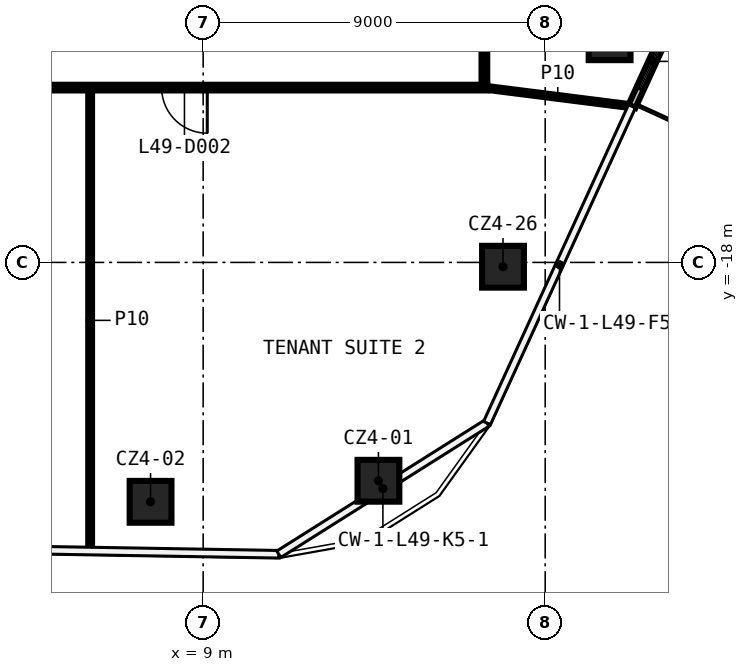
"""IFC4 building model, lengths in metres.
Left out: names, types, materials, properties, quantities, classifications, styles, units other than length and angle.
Written with IfcOpenShell. Run it as: python <this file> out.ifc"""

import sys

from ifc_helpers import new_model, si_unit, direction, frame, frame_2d, origin, origin_2d, place, context, subcontext, project, spatial, rectangle, extrude, element, fill, save


model = new_model("IFC4")
c1 = context("Model", 3, precision=1e-05, world=origin(), true_north=direction((0.0, 1.0)))
c2 = subcontext(c1, "Body", "Model", "MODEL_VIEW")
j1 = project(units=[si_unit("LENGTHUNIT", "METRE"), si_unit("PLANEANGLEUNIT", "RADIAN")], contexts=[c1])
p1 = place(None, origin())
s1 = spatial("IfcSite", under=j1, at=p1, CompositionType="ELEMENT")
p2 = place(p1, origin())
s2 = spatial("IfcBuilding", under=s1, at=p2, CompositionType="ELEMENT")
p3 = place(p2, frame((0.0, 0.0, 237.0)))
s3 = spatial("IfcBuildingStorey", under=s2, at=p3, CompositionType="ELEMENT", Elevation=237.0)
for number, where, z_axis, x_axis in (
    (1, (13.612, -23.746, 0.0), (0.0, 0.0, 1.0), (1.0, 0.0, 0.0)),
    (2, (7.616, -24.3, 0.0), (0.0, 0.0, 1.0), (1.0, 0.0, 0.0)),
    (3, (19.695, -12.127, 0.0), (0.0, 0.0, 1.0), (1.0, 0.0, 0.0)),
    (4, (16.89, -18.114, 0.0), (0.0, 0.0, 1.0), (1.0, 0.0, 0.0)),
):
    element("IfcColumn", number, at=place(p3, frame(where, z_axis=z_axis, x_axis=x_axis)), inside=s3, PredefinedType="COLUMN", context=c2, shape_type="SweptSolid", body=[
        extrude(rectangle(XDim=1.1, YDim=1.1, at=origin_2d()), origin(), (0.0, 0.0, 1.0), 3.82),
    ])
p4 = place(p3, frame((16.475, -13.4, 0.0), z_axis=(0.0, 0.0, 1.0), x_axis=(-1.0, 0.0, 0.0)))
e5 = element("IfcWall", 5, at=p4, inside=s3, PredefinedType="PARTITIONING", context=c2, shape_type="SweptSolid", body=[
    extrude(rectangle(XDim=18.55, YDim=0.15, at=frame_2d((9.275, 0.0))), origin(), (0.0, 0.0, 1.0), 3.82),
])
p5 = place(p4, frame((7.367, 0.0, 0.0)))
e6 = element("IfcOpeningElement", 6, at=p5, cuts=e5, PredefinedType="OPENING", context=c2, shape_type="SweptSolid", body=[
    extrude(rectangle(XDim=1.2, YDim=2.1, at=frame_2d((0.6, 1.05))), frame((0.0, 0.085, 0.0), z_axis=(0.0, -1.0, 0.0), x_axis=(1.0, 0.0, 0.0)), (0.0, 0.0, 1.0), 0.17),
])
p6 = place(p3, frame((16.4, 13.325, 0.0), z_axis=(0.0, 0.0, 1.0), x_axis=(0.0, -1.0, 0.0)))
e7 = element("IfcWall", 7, at=p6, inside=s3, PredefinedType="PARTITIONING", context=c2, shape_type="SweptSolid", body=[
    extrude(rectangle(XDim=26.65, YDim=0.15, at=frame_2d((13.325, 0.0))), origin(), (0.0, 0.0, 1.0), 3.82),
])
p7 = place(p6, frame((22.199, 0.0, 0.0)))
e8 = element("IfcOpeningElement", 8, at=p7, cuts=e7, PredefinedType="OPENING", context=c2, shape_type="SweptSolid", body=[
    extrude(rectangle(XDim=1.2, YDim=2.1, at=frame_2d((0.6, 1.05))), frame((0.0, 0.085, 0.0), z_axis=(0.0, -1.0, 0.0), x_axis=(1.0, 0.0, 0.0)), (0.0, 0.0, 1.0), 0.17),
])
p8 = place(p6, frame((5.651, 0.0, 0.0)))
e9 = element("IfcOpeningElement", 9, at=p8, cuts=e7, PredefinedType="OPENING", context=c2, shape_type="SweptSolid", body=[
    extrude(rectangle(XDim=1.2, YDim=2.1, at=frame_2d((0.6, 1.05))), frame((0.0, 0.085, 0.0), z_axis=(0.0, -1.0, 0.0), x_axis=(1.0, 0.0, 0.0)), (0.0, 0.0, 1.0), 0.17),
])
p9 = place(p3, frame((6.026, -25.576, 0.0), z_axis=(0.0, 0.0, 1.0), x_axis=(0.0, 1.0, 0.0)))
e10 = element("IfcWall", 10, at=p9, inside=s3, PredefinedType="PARTITIONING", context=c2, shape_type="SweptSolid", body=[
    extrude(rectangle(XDim=12.101, YDim=0.1, at=frame_2d((6.05, 0.0))), origin(), (0.0, 0.0, 1.0), 3.82),
])
p10 = place(p3, frame((16.4, -13.4, 0.0), z_axis=(0.0, 0.0, 1.0), x_axis=(0.992073977013, -0.125655179493, 0.0)))
e11 = element("IfcWall", 11, at=p10, inside=s3, PredefinedType="PARTITIONING", context=c2, shape_type="SweptSolid", body=[
    extrude(rectangle(XDim=3.894, YDim=0.1, at=frame_2d((1.947, 0.0))), origin(), (0.0, 0.0, 1.0), 3.82),
])
p11 = place(p3, frame((20.283, -13.892, 0.0), z_axis=(0.0, 0.0, 1.0), x_axis=(0.416106802435, 0.909315747674, 0.0)))
e12 = element("IfcWall", 12, at=p11, inside=s3, PredefinedType="SOLIDWALL", context=c2, shape_type="SweptSolid", body=[
    extrude(rectangle(XDim=13.765, YDim=0.2, at=frame_2d((6.882, 0.0))), origin(), (0.0, 0.0, 1.0), 3.75),
])
p12 = place(p11, frame((0.5, 0.0, 0.6)))
e13 = element("IfcOpeningElement", 13, at=p12, cuts=e12, PredefinedType="OPENING", context=c2, shape_type="SweptSolid", body=[
    extrude(rectangle(XDim=1.6, YDim=2.4, at=frame_2d((0.8, 1.2))), frame((0.0, 0.11, 0.0), z_axis=(0.0, -1.0, 0.0), x_axis=(1.0, 0.0, 0.0)), (0.0, 0.0, 1.0), 0.22),
])
p13 = place(p11, frame((2.4, 0.0, 0.0)))
e14 = element("IfcOpeningElement", 14, at=p13, cuts=e12, PredefinedType="OPENING", context=c2, shape_type="SweptSolid", body=[
    extrude(rectangle(XDim=1.2, YDim=2.4, at=frame_2d((0.6, 1.2))), frame((0.0, 0.11, 0.0), z_axis=(0.0, -1.0, 0.0), x_axis=(1.0, 0.0, 0.0)), (0.0, 0.0, 1.0), 0.22),
])
p14 = place(p11, frame((6.588, 0.0, 0.6)))
e15 = element("IfcOpeningElement", 15, at=p14, cuts=e12, PredefinedType="OPENING", context=c2, shape_type="SweptSolid", body=[
    extrude(rectangle(XDim=1.6, YDim=2.4, at=frame_2d((0.8, 1.2))), frame((0.0, 0.11, 0.0), z_axis=(0.0, -1.0, 0.0), x_axis=(1.0, 0.0, 0.0)), (0.0, 0.0, 1.0), 0.22),
])
p15 = place(p11, frame((5.088, 0.0, 0.0)))
e16 = element("IfcOpeningElement", 16, at=p15, cuts=e12, PredefinedType="OPENING", context=c2, shape_type="SweptSolid", body=[
    extrude(rectangle(XDim=1.2, YDim=2.4, at=frame_2d((0.6, 1.2))), frame((0.0, 0.11, 0.0), z_axis=(0.0, -1.0, 0.0), x_axis=(1.0, 0.0, 0.0)), (0.0, 0.0, 1.0), 0.22),
])
p16 = place(p11, frame((11.176, 0.0, 0.6)))
e17 = element("IfcOpeningElement", 17, at=p16, cuts=e12, PredefinedType="OPENING", context=c2, shape_type="SweptSolid", body=[
    extrude(rectangle(XDim=1.6, YDim=2.4, at=frame_2d((0.8, 1.2))), frame((0.0, 0.11, 0.0), z_axis=(0.0, -1.0, 0.0), x_axis=(1.0, 0.0, 0.0)), (0.0, 0.0, 1.0), 0.22),
])
p17 = place(p11, frame((9.676, 0.0, 0.0)))
e18 = element("IfcOpeningElement", 18, at=p17, cuts=e12, PredefinedType="OPENING", context=c2, shape_type="SweptSolid", body=[
    extrude(rectangle(XDim=1.2, YDim=2.4, at=frame_2d((0.6, 1.2))), frame((0.0, 0.11, 0.0), z_axis=(0.0, -1.0, 0.0), x_axis=(1.0, 0.0, 0.0)), (0.0, 0.0, 1.0), 0.22),
])
p18 = place(p5, origin())
e19 = element("IfcDoor", 19, at=p18, inside=s3, OperationType="SINGLE_SWING_LEFT", PredefinedType="DOOR", context=c2, shape_type="SweptSolid", body=[
    extrude(rectangle(XDim=1.2, YDim=2.1, at=frame_2d((0.6, 1.05))), frame((0.0, 0.025, 0.0), z_axis=(0.0, -1.0, 0.0), x_axis=(1.0, 0.0, 0.0)), (0.0, 0.0, 1.0), 0.05),
])
fill(e6, e19)
p19 = place(p12, origin())
e20 = element("IfcWindow", 20, at=p19, inside=s3, PartitioningType="SINGLE_PANEL", PredefinedType="WINDOW", context=c2, shape_type="SweptSolid", body=[
    extrude(rectangle(XDim=1.6, YDim=2.4, at=frame_2d((0.8, 1.2))), frame((0.0, 0.03, 0.0), z_axis=(0.0, -1.0, 0.0), x_axis=(1.0, 0.0, 0.0)), (0.0, 0.0, 1.0), 0.06),
])
fill(e13, e20)
save(model, sys.argv[1])
